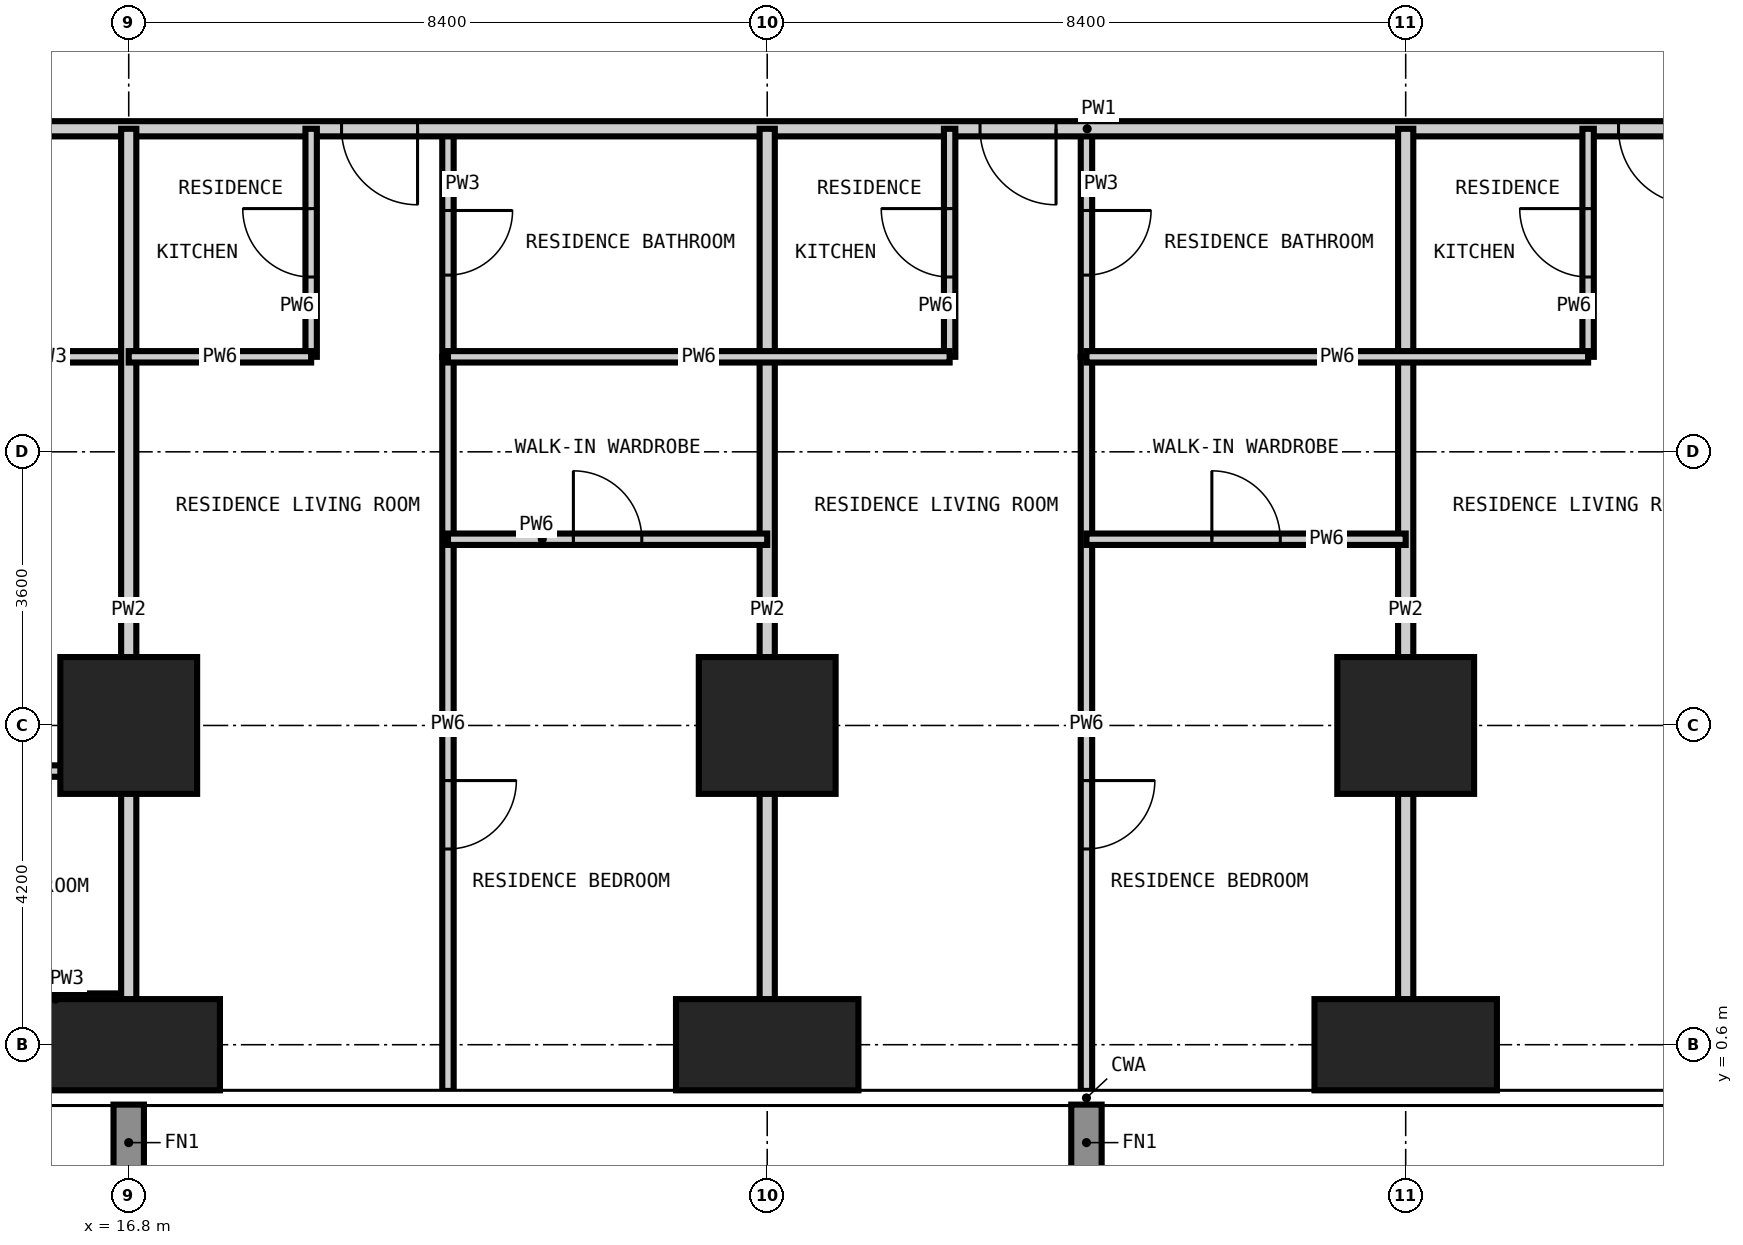
"""IFC4 building model, lengths in metres.
Left out: names, types, materials, properties, quantities, classifications, styles, units other than length and angle.
Written with IfcOpenShell. Run it as: python <this file> out.ifc"""

import sys

from ifc_helpers import new_model, si_unit, direction, frame, frame_2d, origin, origin_2d, place, context, subcontext, project, spatial, rectangle, extrude, element, fill, save


model = new_model("IFC4")
c1 = context("Model", 3, precision=1e-05, world=origin(), true_north=direction((0.0, 1.0)))
c2 = subcontext(c1, "Body", "Model", "MODEL_VIEW")
j1 = project(units=[si_unit("LENGTHUNIT", "METRE"), si_unit("PLANEANGLEUNIT", "RADIAN")], contexts=[c1])
p1 = place(None, origin())
s1 = spatial("IfcSite", under=j1, at=p1, CompositionType="ELEMENT")
p2 = place(p1, origin())
s2 = spatial("IfcBuilding", under=s1, at=p2, CompositionType="ELEMENT")
p3 = place(p2, frame((0.0, 0.0, 52.2)))
s3 = spatial("IfcBuildingStorey", under=s2, at=p3, CompositionType="ELEMENT", Elevation=52.2)
p4 = place(p3, frame((16.8, 0.6, -0.35), z_axis=(0.0, 0.0, 1.0), x_axis=(1.0, 0.0, 0.0)))
e1 = element("IfcColumn", 1, at=p4, inside=s3, PredefinedType="COLUMN", context=c2, shape_type="SweptSolid", body=[
    extrude(rectangle(XDim=2.4, YDim=1.2, at=origin_2d()), origin(), (0.0, 0.0, 1.0), 3.6),
])
p5 = place(p3, frame((16.8, 4.8, -0.35), z_axis=(0.0, 0.0, 1.0), x_axis=(1.0, 0.0, 0.0)))
e2 = element("IfcColumn", 2, at=p5, inside=s3, PredefinedType="COLUMN", context=c2, shape_type="SweptSolid", body=[
    extrude(rectangle(XDim=1.8, YDim=1.8, at=origin_2d()), origin(), (0.0, 0.0, 1.0), 3.6),
])
p6 = place(p3, frame((25.2, 0.6, -0.35), z_axis=(0.0, 0.0, 1.0), x_axis=(1.0, 0.0, 0.0)))
e3 = element("IfcColumn", 3, at=p6, inside=s3, PredefinedType="COLUMN", context=c2, shape_type="SweptSolid", body=[
    extrude(rectangle(XDim=2.4, YDim=1.2, at=origin_2d()), origin(), (0.0, 0.0, 1.0), 3.6),
])
p7 = place(p3, frame((25.2, 4.8, -0.35), z_axis=(0.0, 0.0, 1.0), x_axis=(1.0, 0.0, 0.0)))
e4 = element("IfcColumn", 4, at=p7, inside=s3, PredefinedType="COLUMN", context=c2, shape_type="SweptSolid", body=[
    extrude(rectangle(XDim=1.8, YDim=1.8, at=origin_2d()), origin(), (0.0, 0.0, 1.0), 3.6),
])
p8 = place(p3, frame((33.6, 0.6, -0.35), z_axis=(0.0, 0.0, 1.0), x_axis=(1.0, 0.0, 0.0)))
e5 = element("IfcColumn", 5, at=p8, inside=s3, PredefinedType="COLUMN", context=c2, shape_type="SweptSolid", body=[
    extrude(rectangle(XDim=2.4, YDim=1.2, at=origin_2d()), origin(), (0.0, 0.0, 1.0), 3.6),
])
p9 = place(p3, frame((33.6, 4.8, -0.35), z_axis=(0.0, 0.0, 1.0), x_axis=(1.0, 0.0, 0.0)))
e6 = element("IfcColumn", 6, at=p9, inside=s3, PredefinedType="COLUMN", context=c2, shape_type="SweptSolid", body=[
    extrude(rectangle(XDim=1.8, YDim=1.8, at=origin_2d()), origin(), (0.0, 0.0, 1.0), 3.6),
])
p10 = place(p3, frame((21.0, 9.65, 0.0), z_axis=(0.0, 0.0, 1.0), x_axis=(0.0, 1.0, 0.0)))
e7 = element("IfcWall", 7, at=p10, inside=s3, PredefinedType="PARTITIONING", context=c2, shape_type="SweptSolid", body=[
    extrude(rectangle(XDim=3.0, YDim=0.15, at=frame_2d((1.5, 0.0))), origin(), (0.0, 0.0, 1.0), 3.25),
])
p11 = place(p10, frame((1.075, 0.0, 0.0)))
e8 = element("IfcOpeningElement", 8, at=p11, cuts=e7, PredefinedType="OPENING", context=c2, shape_type="SweptSolid", body=[
    extrude(rectangle(XDim=0.85, YDim=2.1, at=frame_2d((0.425, 1.05))), frame((0.0, 0.085, 0.0), z_axis=(0.0, -1.0, 0.0), x_axis=(1.0, 0.0, 0.0)), (0.0, 0.0, 1.0), 0.17),
])
p12 = place(p3, frame((29.4, 9.65, 0.0), z_axis=(0.0, 0.0, 1.0), x_axis=(0.0, 1.0, 0.0)))
e9 = element("IfcWall", 9, at=p12, inside=s3, PredefinedType="PARTITIONING", context=c2, shape_type="SweptSolid", body=[
    extrude(rectangle(XDim=3.0, YDim=0.15, at=frame_2d((1.5, 0.0))), origin(), (0.0, 0.0, 1.0), 3.25),
])
p13 = place(p12, frame((1.075, 0.0, 0.0)))
e10 = element("IfcOpeningElement", 10, at=p13, cuts=e9, PredefinedType="OPENING", context=c2, shape_type="SweptSolid", body=[
    extrude(rectangle(XDim=0.85, YDim=2.1, at=frame_2d((0.425, 1.05))), frame((0.0, 0.085, 0.0), z_axis=(0.0, -1.0, 0.0), x_axis=(1.0, 0.0, 0.0)), (0.0, 0.0, 1.0), 0.17),
])
p14 = place(p3, frame((13.2, 1.2, 0.0), z_axis=(0.0, 0.0, 1.0), x_axis=(1.0, 0.0, 0.0)))
e11 = element("IfcWall", 11, at=p14, inside=s3, PredefinedType="PARTITIONING", context=c2, shape_type="SweptSolid", body=[
    extrude(rectangle(XDim=3.6, YDim=0.15, at=frame_2d((1.8, 0.0))), origin(), (0.0, 0.0, 1.0), 3.25),
])
p15 = place(p14, frame((1.375, 0.0, 0.0)))
e12 = element("IfcOpeningElement", 12, at=p15, cuts=e11, PredefinedType="OPENING", context=c2, shape_type="SweptSolid", body=[
    extrude(rectangle(XDim=0.85, YDim=2.1, at=frame_2d((0.425, 1.05))), frame((0.0, 0.085, 0.0), z_axis=(0.0, -1.0, 0.0), x_axis=(1.0, 0.0, 0.0)), (0.0, 0.0, 1.0), 0.17),
])
p16 = place(p3, frame((12.65, 9.65, 0.0), z_axis=(0.0, 0.0, 1.0), x_axis=(1.0, 0.0, 0.0)))
e13 = element("IfcWall", 13, at=p16, inside=s3, PredefinedType="PARTITIONING", context=c2, shape_type="SweptSolid", body=[
    extrude(rectangle(XDim=4.15, YDim=0.15, at=frame_2d((2.075, 0.0))), origin(), (0.0, 0.0, 1.0), 3.25),
])
p17 = place(p16, frame((1.65, 0.0, 0.0)))
e14 = element("IfcOpeningElement", 14, at=p17, cuts=e13, PredefinedType="OPENING", context=c2, shape_type="SweptSolid", body=[
    extrude(rectangle(XDim=0.85, YDim=2.1, at=frame_2d((0.425, 1.05))), frame((0.0, 0.085, 0.0), z_axis=(0.0, -1.0, 0.0), x_axis=(1.0, 0.0, 0.0)), (0.0, 0.0, 1.0), 0.17),
])
p18 = place(p3, frame((44.95, 12.65, 0.0), z_axis=(0.0, 0.0, 1.0), x_axis=(-1.0, 0.0, 0.0)))
e15 = element("IfcWall", 15, at=p18, inside=s3, PredefinedType="PARTITIONING", context=c2, shape_type="SweptSolid", body=[
    extrude(rectangle(XDim=32.3, YDim=0.2, at=frame_2d((16.15, 0.0))), origin(), (0.0, 0.0, 1.0), 3.25),
])
p19 = place(p18, frame((24.35, 0.0, 0.0)))
e16 = element("IfcOpeningElement", 16, at=p19, cuts=e15, PredefinedType="OPENING", context=c2, shape_type="SweptSolid", body=[
    extrude(rectangle(XDim=1.0, YDim=2.2, at=frame_2d((0.5, 1.1))), frame((0.0, 0.11, 0.0), z_axis=(0.0, -1.0, 0.0), x_axis=(1.0, 0.0, 0.0)), (0.0, 0.0, 1.0), 0.22),
])
p20 = place(p18, frame((15.95, 0.0, 0.0)))
e17 = element("IfcOpeningElement", 17, at=p20, cuts=e15, PredefinedType="OPENING", context=c2, shape_type="SweptSolid", body=[
    extrude(rectangle(XDim=1.0, YDim=2.2, at=frame_2d((0.5, 1.1))), frame((0.0, 0.11, 0.0), z_axis=(0.0, -1.0, 0.0), x_axis=(1.0, 0.0, 0.0)), (0.0, 0.0, 1.0), 0.22),
])
p21 = place(p18, frame((7.55, 0.0, 0.0)))
e18 = element("IfcOpeningElement", 18, at=p21, cuts=e15, PredefinedType="OPENING", context=c2, shape_type="SweptSolid", body=[
    extrude(rectangle(XDim=1.0, YDim=2.2, at=frame_2d((0.5, 1.1))), frame((0.0, 0.11, 0.0), z_axis=(0.0, -1.0, 0.0), x_axis=(1.0, 0.0, 0.0)), (0.0, 0.0, 1.0), 0.22),
])
for number, where, z_axis, x_axis in (
    (19, (16.8, -0.008, 0.0), (0.0, 0.0, 1.0), (0.0, 1.0, 0.0)),
    (20, (25.2, -0.008, 0.0), (0.0, 0.0, 1.0), (0.0, 1.0, 0.0)),
    (21, (33.6, -0.008, 0.0), (0.0, 0.0, 1.0), (0.0, 1.0, 0.0)),
):
    element("IfcWall", number, at=place(p3, frame(where, z_axis=z_axis, x_axis=x_axis)), inside=s3, PredefinedType="PARTITIONING", context=c2, shape_type="SweptSolid", body=[
        extrude(rectangle(XDim=12.658, YDim=0.2, at=frame_2d((6.329, 0.0))), origin(), (0.0, 0.0, 1.0), 3.25),
    ])
p22 = place(p3, frame((19.2, 9.65, 0.0), z_axis=(0.0, 0.0, 1.0), x_axis=(0.0, 1.0, 0.0)))
e22 = element("IfcWall", 22, at=p22, inside=s3, PredefinedType="PARTITIONING", context=c2, shape_type="SweptSolid", body=[
    extrude(rectangle(XDim=3.0, YDim=0.15, at=frame_2d((1.5, 0.0))), origin(), (0.0, 0.0, 1.0), 3.25),
])
p23 = place(p22, frame((1.05, 0.0, 0.0)))
e23 = element("IfcOpeningElement", 23, at=p23, cuts=e22, PredefinedType="OPENING", context=c2, shape_type="SweptSolid", body=[
    extrude(rectangle(XDim=0.9, YDim=2.1, at=frame_2d((0.45, 1.05))), frame((0.0, 0.085, 0.0), z_axis=(0.0, -1.0, 0.0), x_axis=(1.0, 0.0, 0.0)), (0.0, 0.0, 1.0), 0.17),
])
p24 = place(p3, frame((21.0, -0.008, 0.0), z_axis=(0.0, 0.0, 1.0), x_axis=(0.0, 1.0, 0.0)))
e24 = element("IfcWall", 24, at=p24, inside=s3, PredefinedType="PARTITIONING", context=c2, shape_type="SweptSolid", body=[
    extrude(rectangle(XDim=9.658, YDim=0.15, at=frame_2d((4.829, 0.0))), origin(), (0.0, 0.0, 1.0), 3.25),
])
p25 = place(p24, frame((3.183, 0.0, 0.0)))
e25 = element("IfcOpeningElement", 25, at=p25, cuts=e24, PredefinedType="OPENING", context=c2, shape_type="SweptSolid", body=[
    extrude(rectangle(XDim=0.9, YDim=2.1, at=frame_2d((0.45, 1.05))), frame((0.0, 0.085, 0.0), z_axis=(0.0, -1.0, 0.0), x_axis=(1.0, 0.0, 0.0)), (0.0, 0.0, 1.0), 0.17),
])
p26 = place(p3, frame((27.6, 9.65, 0.0), z_axis=(0.0, 0.0, 1.0), x_axis=(0.0, 1.0, 0.0)))
e26 = element("IfcWall", 26, at=p26, inside=s3, PredefinedType="PARTITIONING", context=c2, shape_type="SweptSolid", body=[
    extrude(rectangle(XDim=3.0, YDim=0.15, at=frame_2d((1.5, 0.0))), origin(), (0.0, 0.0, 1.0), 3.25),
])
p27 = place(p26, frame((1.05, 0.0, 0.0)))
e27 = element("IfcOpeningElement", 27, at=p27, cuts=e26, PredefinedType="OPENING", context=c2, shape_type="SweptSolid", body=[
    extrude(rectangle(XDim=0.9, YDim=2.1, at=frame_2d((0.45, 1.05))), frame((0.0, 0.085, 0.0), z_axis=(0.0, -1.0, 0.0), x_axis=(1.0, 0.0, 0.0)), (0.0, 0.0, 1.0), 0.17),
])
p28 = place(p3, frame((29.4, -0.008, 0.0), z_axis=(0.0, 0.0, 1.0), x_axis=(0.0, 1.0, 0.0)))
e28 = element("IfcWall", 28, at=p28, inside=s3, PredefinedType="PARTITIONING", context=c2, shape_type="SweptSolid", body=[
    extrude(rectangle(XDim=9.658, YDim=0.15, at=frame_2d((4.829, 0.0))), origin(), (0.0, 0.0, 1.0), 3.25),
])
p29 = place(p28, frame((3.183, 0.0, 0.0)))
e29 = element("IfcOpeningElement", 29, at=p29, cuts=e28, PredefinedType="OPENING", context=c2, shape_type="SweptSolid", body=[
    extrude(rectangle(XDim=0.9, YDim=2.1, at=frame_2d((0.45, 1.05))), frame((0.0, 0.085, 0.0), z_axis=(0.0, -1.0, 0.0), x_axis=(1.0, 0.0, 0.0)), (0.0, 0.0, 1.0), 0.17),
])
p30 = place(p3, frame((36.0, 9.65, 0.0), z_axis=(0.0, 0.0, 1.0), x_axis=(0.0, 1.0, 0.0)))
e30 = element("IfcWall", 30, at=p30, inside=s3, PredefinedType="PARTITIONING", context=c2, shape_type="SweptSolid", body=[
    extrude(rectangle(XDim=3.0, YDim=0.15, at=frame_2d((1.5, 0.0))), origin(), (0.0, 0.0, 1.0), 3.25),
])
p31 = place(p30, frame((1.05, 0.0, 0.0)))
e31 = element("IfcOpeningElement", 31, at=p31, cuts=e30, PredefinedType="OPENING", context=c2, shape_type="SweptSolid", body=[
    extrude(rectangle(XDim=0.9, YDim=2.1, at=frame_2d((0.45, 1.05))), frame((0.0, 0.085, 0.0), z_axis=(0.0, -1.0, 0.0), x_axis=(1.0, 0.0, 0.0)), (0.0, 0.0, 1.0), 0.17),
])
p32 = place(p3, frame((-0.008, 4.2, 0.0), z_axis=(0.0, 0.0, 1.0), x_axis=(1.0, 0.0, 0.0)))
e32 = element("IfcWall", 32, at=p32, inside=s3, PredefinedType="PARTITIONING", context=c2, shape_type="SweptSolid", body=[
    extrude(rectangle(XDim=16.808, YDim=0.15, at=frame_2d((8.404, 0.0))), origin(), (0.0, 0.0, 1.0), 3.25),
])
p33 = place(p32, frame((4.958, 0.0, 0.0)))
e33 = element("IfcOpeningElement", 33, at=p33, cuts=e32, PredefinedType="OPENING", context=c2, shape_type="SweptSolid", body=[
    extrude(rectangle(XDim=0.9, YDim=2.1, at=frame_2d((0.45, 1.05))), frame((0.0, 0.085, 0.0), z_axis=(0.0, -1.0, 0.0), x_axis=(1.0, 0.0, 0.0)), (0.0, 0.0, 1.0), 0.17),
])
p34 = place(p3, frame((21.0, 7.25, 0.0), z_axis=(0.0, 0.0, 1.0), x_axis=(1.0, 0.0, 0.0)))
e34 = element("IfcWall", 34, at=p34, inside=s3, PredefinedType="PARTITIONING", context=c2, shape_type="SweptSolid", body=[
    extrude(rectangle(XDim=4.2, YDim=0.15, at=frame_2d((2.1, 0.0))), origin(), (0.0, 0.0, 1.0), 3.25),
])
p35 = place(p34, frame((1.65, 0.0, 0.0)))
e35 = element("IfcOpeningElement", 35, at=p35, cuts=e34, PredefinedType="OPENING", context=c2, shape_type="SweptSolid", body=[
    extrude(rectangle(XDim=0.9, YDim=2.1, at=frame_2d((0.45, 1.05))), frame((0.0, 0.085, 0.0), z_axis=(0.0, -1.0, 0.0), x_axis=(1.0, 0.0, 0.0)), (0.0, 0.0, 1.0), 0.17),
])
p36 = place(p3, frame((29.4, 7.25, 0.0), z_axis=(0.0, 0.0, 1.0), x_axis=(1.0, 0.0, 0.0)))
e36 = element("IfcWall", 36, at=p36, inside=s3, PredefinedType="PARTITIONING", context=c2, shape_type="SweptSolid", body=[
    extrude(rectangle(XDim=4.2, YDim=0.15, at=frame_2d((2.1, 0.0))), origin(), (0.0, 0.0, 1.0), 3.25),
])
p37 = place(p36, frame((1.65, 0.0, 0.0)))
e37 = element("IfcOpeningElement", 37, at=p37, cuts=e36, PredefinedType="OPENING", context=c2, shape_type="SweptSolid", body=[
    extrude(rectangle(XDim=0.9, YDim=2.1, at=frame_2d((0.45, 1.05))), frame((0.0, 0.085, 0.0), z_axis=(0.0, -1.0, 0.0), x_axis=(1.0, 0.0, 0.0)), (0.0, 0.0, 1.0), 0.17),
])
p38 = place(p3, frame((16.8, 9.65, 0.0), z_axis=(0.0, 0.0, 1.0), x_axis=(1.0, 0.0, 0.0)))
e38 = element("IfcWall", 38, at=p38, inside=s3, PredefinedType="PARTITIONING", context=c2, shape_type="SweptSolid", body=[
    extrude(rectangle(XDim=2.4, YDim=0.15, at=frame_2d((1.2, 0.0))), origin(), (0.0, 0.0, 1.0), 3.25),
])
for number, where, z_axis, x_axis in (
    (39, (21.0, 9.65, 0.0), (0.0, 0.0, 1.0), (1.0, 0.0, 0.0)),
    (40, (29.4, 9.65, 0.0), (0.0, 0.0, 1.0), (1.0, 0.0, 0.0)),
):
    element("IfcWall", number, at=place(p3, frame(where, z_axis=z_axis, x_axis=x_axis)), inside=s3, PredefinedType="PARTITIONING", context=c2, shape_type="SweptSolid", body=[
        extrude(rectangle(XDim=6.6, YDim=0.15, at=frame_2d((3.3, 0.0))), origin(), (0.0, 0.0, 1.0), 3.25),
    ])
p39 = place(p19, origin())
e41 = element("IfcDoor", 41, at=p39, inside=s3, OperationType="SINGLE_SWING_LEFT", PredefinedType="DOOR", context=c2, shape_type="SweptSolid", body=[
    extrude(rectangle(XDim=1.0, YDim=2.2, at=frame_2d((0.5, 1.1))), frame((0.0, 0.025, 0.0), z_axis=(0.0, -1.0, 0.0), x_axis=(1.0, 0.0, 0.0)), (0.0, 0.0, 1.0), 0.05),
])
fill(e16, e41)
p40 = place(p23, origin())
e42 = element("IfcDoor", 42, at=p40, inside=s3, OperationType="SINGLE_SWING_RIGHT", PredefinedType="DOOR", context=c2, shape_type="SweptSolid", body=[
    extrude(rectangle(XDim=0.9, YDim=2.1, at=frame_2d((0.45, 1.05))), frame((0.0, 0.025, 0.0), z_axis=(0.0, -1.0, 0.0), x_axis=(1.0, 0.0, 0.0)), (0.0, 0.0, 1.0), 0.05),
])
fill(e23, e42)
p41 = place(p11, frame((0.85, 0.0, 0.0), z_axis=(0.0, 0.0, 1.0), x_axis=(-1.0, 0.0, 0.0)))
e43 = element("IfcDoor", 43, at=p41, inside=s3, OperationType="SINGLE_SWING_LEFT", PredefinedType="DOOR", context=c2, shape_type="SweptSolid", body=[
    extrude(rectangle(XDim=0.85, YDim=2.1, at=frame_2d((0.425, 1.05))), frame((0.0, 0.025, 0.0), z_axis=(0.0, -1.0, 0.0), x_axis=(1.0, 0.0, 0.0)), (0.0, 0.0, 1.0), 0.05),
])
fill(e8, e43)
p42 = place(p35, origin())
e44 = element("IfcDoor", 44, at=p42, inside=s3, OperationType="SINGLE_SWING_LEFT", PredefinedType="DOOR", context=c2, shape_type="SweptSolid", body=[
    extrude(rectangle(XDim=0.9, YDim=2.1, at=frame_2d((0.45, 1.05))), frame((0.0, 0.025, 0.0), z_axis=(0.0, -1.0, 0.0), x_axis=(1.0, 0.0, 0.0)), (0.0, 0.0, 1.0), 0.05),
])
fill(e35, e44)
p43 = place(p25, frame((0.9, 0.0, 0.0), z_axis=(0.0, 0.0, 1.0), x_axis=(-1.0, 0.0, 0.0)))
e45 = element("IfcDoor", 45, at=p43, inside=s3, OperationType="SINGLE_SWING_LEFT", PredefinedType="DOOR", context=c2, shape_type="SweptSolid", body=[
    extrude(rectangle(XDim=0.9, YDim=2.1, at=frame_2d((0.45, 1.05))), frame((0.0, 0.025, 0.0), z_axis=(0.0, -1.0, 0.0), x_axis=(1.0, 0.0, 0.0)), (0.0, 0.0, 1.0), 0.05),
])
fill(e25, e45)
p44 = place(p20, origin())
e46 = element("IfcDoor", 46, at=p44, inside=s3, OperationType="SINGLE_SWING_LEFT", PredefinedType="DOOR", context=c2, shape_type="SweptSolid", body=[
    extrude(rectangle(XDim=1.0, YDim=2.2, at=frame_2d((0.5, 1.1))), frame((0.0, 0.025, 0.0), z_axis=(0.0, -1.0, 0.0), x_axis=(1.0, 0.0, 0.0)), (0.0, 0.0, 1.0), 0.05),
])
fill(e17, e46)
p45 = place(p27, origin())
e47 = element("IfcDoor", 47, at=p45, inside=s3, OperationType="SINGLE_SWING_RIGHT", PredefinedType="DOOR", context=c2, shape_type="SweptSolid", body=[
    extrude(rectangle(XDim=0.9, YDim=2.1, at=frame_2d((0.45, 1.05))), frame((0.0, 0.025, 0.0), z_axis=(0.0, -1.0, 0.0), x_axis=(1.0, 0.0, 0.0)), (0.0, 0.0, 1.0), 0.05),
])
fill(e27, e47)
p46 = place(p13, frame((0.85, 0.0, 0.0), z_axis=(0.0, 0.0, 1.0), x_axis=(-1.0, 0.0, 0.0)))
e48 = element("IfcDoor", 48, at=p46, inside=s3, OperationType="SINGLE_SWING_LEFT", PredefinedType="DOOR", context=c2, shape_type="SweptSolid", body=[
    extrude(rectangle(XDim=0.85, YDim=2.1, at=frame_2d((0.425, 1.05))), frame((0.0, 0.025, 0.0), z_axis=(0.0, -1.0, 0.0), x_axis=(1.0, 0.0, 0.0)), (0.0, 0.0, 1.0), 0.05),
])
fill(e10, e48)
p47 = place(p37, origin())
e49 = element("IfcDoor", 49, at=p47, inside=s3, OperationType="SINGLE_SWING_LEFT", PredefinedType="DOOR", context=c2, shape_type="SweptSolid", body=[
    extrude(rectangle(XDim=0.9, YDim=2.1, at=frame_2d((0.45, 1.05))), frame((0.0, 0.025, 0.0), z_axis=(0.0, -1.0, 0.0), x_axis=(1.0, 0.0, 0.0)), (0.0, 0.0, 1.0), 0.05),
])
fill(e37, e49)
p48 = place(p29, frame((0.9, 0.0, 0.0), z_axis=(0.0, 0.0, 1.0), x_axis=(-1.0, 0.0, 0.0)))
e50 = element("IfcDoor", 50, at=p48, inside=s3, OperationType="SINGLE_SWING_LEFT", PredefinedType="DOOR", context=c2, shape_type="SweptSolid", body=[
    extrude(rectangle(XDim=0.9, YDim=2.1, at=frame_2d((0.45, 1.05))), frame((0.0, 0.025, 0.0), z_axis=(0.0, -1.0, 0.0), x_axis=(1.0, 0.0, 0.0)), (0.0, 0.0, 1.0), 0.05),
])
fill(e29, e50)
p49 = place(p21, origin())
e51 = element("IfcDoor", 51, at=p49, inside=s3, OperationType="SINGLE_SWING_LEFT", PredefinedType="DOOR", context=c2, shape_type="SweptSolid", body=[
    extrude(rectangle(XDim=1.0, YDim=2.2, at=frame_2d((0.5, 1.1))), frame((0.0, 0.025, 0.0), z_axis=(0.0, -1.0, 0.0), x_axis=(1.0, 0.0, 0.0)), (0.0, 0.0, 1.0), 0.05),
])
fill(e18, e51)
p50 = place(p31, origin())
e52 = element("IfcDoor", 52, at=p50, inside=s3, OperationType="SINGLE_SWING_RIGHT", PredefinedType="DOOR", context=c2, shape_type="SweptSolid", body=[
    extrude(rectangle(XDim=0.9, YDim=2.1, at=frame_2d((0.45, 1.05))), frame((0.0, 0.025, 0.0), z_axis=(0.0, -1.0, 0.0), x_axis=(1.0, 0.0, 0.0)), (0.0, 0.0, 1.0), 0.05),
])
fill(e31, e52)
save(model, sys.argv[1])
